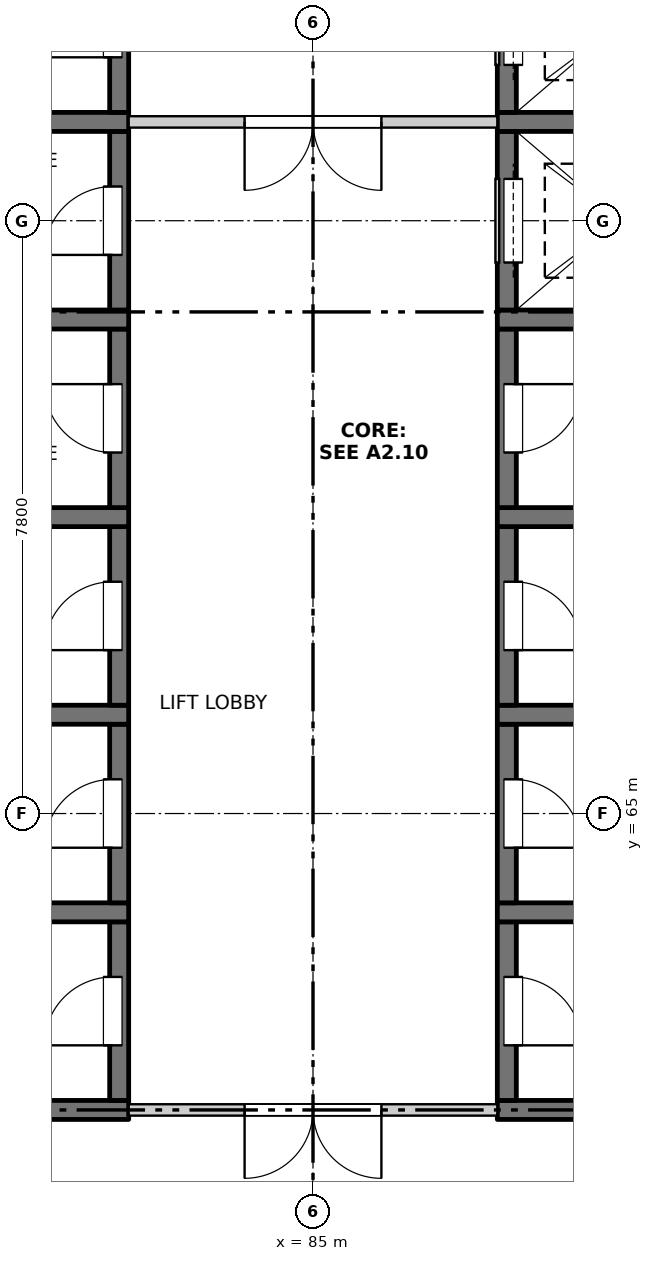
"""IFC4 building model, lengths in metres.
Left out: names, types, materials, properties, quantities, classifications, styles, units other than length and angle.
Written with IfcOpenShell. Run it as: python <this file> out.ifc"""

import sys

from ifc_helpers import new_model, si_unit, direction, frame, frame_2d, origin, place, context, subcontext, project, spatial, rectangle, extrude, element, fill, save


model = new_model("IFC4")
c1 = context("Model", 3, precision=1e-05, world=origin(), true_north=direction((0.0, 1.0)))
c2 = subcontext(c1, "Body", "Model", "MODEL_VIEW")
j1 = project(units=[si_unit("LENGTHUNIT", "METRE"), si_unit("PLANEANGLEUNIT", "RADIAN")], contexts=[c1])
p1 = place(None, origin())
s1 = spatial("IfcSite", under=j1, at=p1, CompositionType="ELEMENT")
p2 = place(p1, origin())
s2 = spatial("IfcBuilding", under=s1, at=p2, CompositionType="ELEMENT")
p3 = place(p2, frame((0.0, 0.0, 256.2)))
s3 = spatial("IfcBuildingStorey", under=s2, at=p3, CompositionType="ELEMENT", Elevation=256.2)
p4 = place(p3, frame((79.575, 61.1, -0.25), z_axis=(0.0, 0.0, 1.0), x_axis=(1.0, 0.0, 0.0)))
e1 = element("IfcWall", 1, at=p4, inside=s3, PredefinedType="SOLIDWALL", context=c2, shape_type="SweptSolid", body=[
    extrude(rectangle(XDim=3.0, YDim=0.25, at=frame_2d((1.5, 0.0))), origin(), (0.0, 0.0, 1.0), 3.4),
])
p5 = place(p3, frame((82.45, 61.225, -0.25), z_axis=(0.0, 0.0, 1.0), x_axis=(0.0, 1.0, 0.0)))
e2 = element("IfcWall", 2, at=p5, inside=s3, PredefinedType="SOLIDWALL", context=c2, shape_type="SweptSolid", body=[
    extrude(rectangle(XDim=2.35, YDim=0.25, at=frame_2d((1.175, 0.0))), origin(), (0.0, 0.0, 1.0), 3.4),
])
p6 = place(p5, frame((0.725, 0.0, 0.25)))
e3 = element("IfcOpeningElement", 3, at=p6, cuts=e2, PredefinedType="OPENING", context=c2, shape_type="SweptSolid", body=[
    extrude(rectangle(XDim=0.9, YDim=2.1, at=frame_2d((0.45, 1.05))), frame((0.0, 0.135, 0.0), z_axis=(0.0, -1.0, 0.0), x_axis=(1.0, 0.0, 0.0)), (0.0, 0.0, 1.0), 0.27),
])
p7 = place(p3, frame((79.575, 63.7, -0.25), z_axis=(0.0, 0.0, 1.0), x_axis=(1.0, 0.0, 0.0)))
e4 = element("IfcWall", 4, at=p7, inside=s3, PredefinedType="SOLIDWALL", context=c2, shape_type="SweptSolid", body=[
    extrude(rectangle(XDim=3.0, YDim=0.25, at=frame_2d((1.5, 0.0))), origin(), (0.0, 0.0, 1.0), 3.4),
])
p8 = place(p3, frame((82.45, 63.825, -0.25), z_axis=(0.0, 0.0, 1.0), x_axis=(0.0, 1.0, 0.0)))
e5 = element("IfcWall", 5, at=p8, inside=s3, PredefinedType="SOLIDWALL", context=c2, shape_type="SweptSolid", body=[
    extrude(rectangle(XDim=2.35, YDim=0.25, at=frame_2d((1.175, 0.0))), origin(), (0.0, 0.0, 1.0), 3.4),
])
p9 = place(p8, frame((0.725, 0.0, 0.25)))
e6 = element("IfcOpeningElement", 6, at=p9, cuts=e5, PredefinedType="OPENING", context=c2, shape_type="SweptSolid", body=[
    extrude(rectangle(XDim=0.9, YDim=2.1, at=frame_2d((0.45, 1.05))), frame((0.0, 0.135, 0.0), z_axis=(0.0, -1.0, 0.0), x_axis=(1.0, 0.0, 0.0)), (0.0, 0.0, 1.0), 0.27),
])
p10 = place(p3, frame((79.575, 66.3, -0.25), z_axis=(0.0, 0.0, 1.0), x_axis=(1.0, 0.0, 0.0)))
e7 = element("IfcWall", 7, at=p10, inside=s3, PredefinedType="SOLIDWALL", context=c2, shape_type="SweptSolid", body=[
    extrude(rectangle(XDim=3.0, YDim=0.25, at=frame_2d((1.5, 0.0))), origin(), (0.0, 0.0, 1.0), 3.4),
])
p11 = place(p3, frame((82.45, 66.425, -0.25), z_axis=(0.0, 0.0, 1.0), x_axis=(0.0, 1.0, 0.0)))
e8 = element("IfcWall", 8, at=p11, inside=s3, PredefinedType="SOLIDWALL", context=c2, shape_type="SweptSolid", body=[
    extrude(rectangle(XDim=2.35, YDim=0.25, at=frame_2d((1.175, 0.0))), origin(), (0.0, 0.0, 1.0), 3.4),
])
p12 = place(p11, frame((0.725, 0.0, 0.25)))
e9 = element("IfcOpeningElement", 9, at=p12, cuts=e8, PredefinedType="OPENING", context=c2, shape_type="SweptSolid", body=[
    extrude(rectangle(XDim=0.9, YDim=2.1, at=frame_2d((0.45, 1.05))), frame((0.0, 0.135, 0.0), z_axis=(0.0, -1.0, 0.0), x_axis=(1.0, 0.0, 0.0)), (0.0, 0.0, 1.0), 0.27),
])
p13 = place(p3, frame((79.575, 68.9, -0.25), z_axis=(0.0, 0.0, 1.0), x_axis=(1.0, 0.0, 0.0)))
e10 = element("IfcWall", 10, at=p13, inside=s3, PredefinedType="SOLIDWALL", context=c2, shape_type="SweptSolid", body=[
    extrude(rectangle(XDim=3.0, YDim=0.25, at=frame_2d((1.5, 0.0))), origin(), (0.0, 0.0, 1.0), 3.4),
])
p14 = place(p3, frame((82.45, 69.025, -0.25), z_axis=(0.0, 0.0, 1.0), x_axis=(0.0, 1.0, 0.0)))
e11 = element("IfcWall", 11, at=p14, inside=s3, PredefinedType="SOLIDWALL", context=c2, shape_type="SweptSolid", body=[
    extrude(rectangle(XDim=2.35, YDim=0.25, at=frame_2d((1.175, 0.0))), origin(), (0.0, 0.0, 1.0), 3.4),
])
p15 = place(p14, frame((0.725, 0.0, 0.25)))
e12 = element("IfcOpeningElement", 12, at=p15, cuts=e11, PredefinedType="OPENING", context=c2, shape_type="SweptSolid", body=[
    extrude(rectangle(XDim=0.9, YDim=2.1, at=frame_2d((0.45, 1.05))), frame((0.0, 0.135, 0.0), z_axis=(0.0, -1.0, 0.0), x_axis=(1.0, 0.0, 0.0)), (0.0, 0.0, 1.0), 0.27),
])
p16 = place(p3, frame((79.575, 71.5, -0.25), z_axis=(0.0, 0.0, 1.0), x_axis=(1.0, 0.0, 0.0)))
e13 = element("IfcWall", 13, at=p16, inside=s3, PredefinedType="SOLIDWALL", context=c2, shape_type="SweptSolid", body=[
    extrude(rectangle(XDim=3.0, YDim=0.25, at=frame_2d((1.5, 0.0))), origin(), (0.0, 0.0, 1.0), 3.4),
])
p17 = place(p3, frame((82.45, 71.625, -0.25), z_axis=(0.0, 0.0, 1.0), x_axis=(0.0, 1.0, 0.0)))
e14 = element("IfcWall", 14, at=p17, inside=s3, PredefinedType="SOLIDWALL", context=c2, shape_type="SweptSolid", body=[
    extrude(rectangle(XDim=2.35, YDim=0.25, at=frame_2d((1.175, 0.0))), origin(), (0.0, 0.0, 1.0), 3.4),
])
p18 = place(p17, frame((0.725, 0.0, 0.25)))
e15 = element("IfcOpeningElement", 15, at=p18, cuts=e14, PredefinedType="OPENING", context=c2, shape_type="SweptSolid", body=[
    extrude(rectangle(XDim=0.9, YDim=2.1, at=frame_2d((0.45, 1.05))), frame((0.0, 0.135, 0.0), z_axis=(0.0, -1.0, 0.0), x_axis=(1.0, 0.0, 0.0)), (0.0, 0.0, 1.0), 0.27),
])
p19 = place(p3, frame((79.575, 74.1, -0.25), z_axis=(0.0, 0.0, 1.0), x_axis=(1.0, 0.0, 0.0)))
e16 = element("IfcWall", 16, at=p19, inside=s3, PredefinedType="SOLIDWALL", context=c2, shape_type="SweptSolid", body=[
    extrude(rectangle(XDim=3.0, YDim=0.25, at=frame_2d((1.5, 0.0))), origin(), (0.0, 0.0, 1.0), 3.4),
])
p20 = place(p3, frame((82.45, 74.225, -0.25), z_axis=(0.0, 0.0, 1.0), x_axis=(0.0, 1.0, 0.0)))
e17 = element("IfcWall", 17, at=p20, inside=s3, PredefinedType="SOLIDWALL", context=c2, shape_type="SweptSolid", body=[
    extrude(rectangle(XDim=2.35, YDim=0.25, at=frame_2d((1.175, 0.0))), origin(), (0.0, 0.0, 1.0), 3.4),
])
p21 = place(p20, frame((0.725, 0.0, 0.25)))
e18 = element("IfcOpeningElement", 18, at=p21, cuts=e17, PredefinedType="OPENING", context=c2, shape_type="SweptSolid", body=[
    extrude(rectangle(XDim=0.9, YDim=2.1, at=frame_2d((0.45, 1.05))), frame((0.0, 0.135, 0.0), z_axis=(0.0, -1.0, 0.0), x_axis=(1.0, 0.0, 0.0)), (0.0, 0.0, 1.0), 0.27),
])
p22 = place(p3, frame((87.425, 61.1, -0.25), z_axis=(0.0, 0.0, 1.0), x_axis=(1.0, 0.0, 0.0)))
e19 = element("IfcWall", 19, at=p22, inside=s3, PredefinedType="SOLIDWALL", context=c2, shape_type="SweptSolid", body=[
    extrude(rectangle(XDim=3.0, YDim=0.25, at=frame_2d((1.5, 0.0))), origin(), (0.0, 0.0, 1.0), 3.4),
])
p23 = place(p3, frame((87.55, 61.225, -0.25), z_axis=(0.0, 0.0, 1.0), x_axis=(0.0, 1.0, 0.0)))
e20 = element("IfcWall", 20, at=p23, inside=s3, PredefinedType="SOLIDWALL", context=c2, shape_type="SweptSolid", body=[
    extrude(rectangle(XDim=2.35, YDim=0.25, at=frame_2d((1.175, 0.0))), origin(), (0.0, 0.0, 1.0), 3.4),
])
p24 = place(p23, frame((0.725, 0.0, 0.25)))
e21 = element("IfcOpeningElement", 21, at=p24, cuts=e20, PredefinedType="OPENING", context=c2, shape_type="SweptSolid", body=[
    extrude(rectangle(XDim=0.9, YDim=2.1, at=frame_2d((0.45, 1.05))), frame((0.0, 0.135, 0.0), z_axis=(0.0, -1.0, 0.0), x_axis=(1.0, 0.0, 0.0)), (0.0, 0.0, 1.0), 0.27),
])
p25 = place(p3, frame((87.425, 63.7, -0.25), z_axis=(0.0, 0.0, 1.0), x_axis=(1.0, 0.0, 0.0)))
e22 = element("IfcWall", 22, at=p25, inside=s3, PredefinedType="SOLIDWALL", context=c2, shape_type="SweptSolid", body=[
    extrude(rectangle(XDim=3.0, YDim=0.25, at=frame_2d((1.5, 0.0))), origin(), (0.0, 0.0, 1.0), 3.4),
])
p26 = place(p3, frame((87.55, 63.825, -0.25), z_axis=(0.0, 0.0, 1.0), x_axis=(0.0, 1.0, 0.0)))
e23 = element("IfcWall", 23, at=p26, inside=s3, PredefinedType="SOLIDWALL", context=c2, shape_type="SweptSolid", body=[
    extrude(rectangle(XDim=2.35, YDim=0.25, at=frame_2d((1.175, 0.0))), origin(), (0.0, 0.0, 1.0), 3.4),
])
p27 = place(p26, frame((0.725, 0.0, 0.25)))
e24 = element("IfcOpeningElement", 24, at=p27, cuts=e23, PredefinedType="OPENING", context=c2, shape_type="SweptSolid", body=[
    extrude(rectangle(XDim=0.9, YDim=2.1, at=frame_2d((0.45, 1.05))), frame((0.0, 0.135, 0.0), z_axis=(0.0, -1.0, 0.0), x_axis=(1.0, 0.0, 0.0)), (0.0, 0.0, 1.0), 0.27),
])
p28 = place(p3, frame((87.425, 66.3, -0.25), z_axis=(0.0, 0.0, 1.0), x_axis=(1.0, 0.0, 0.0)))
e25 = element("IfcWall", 25, at=p28, inside=s3, PredefinedType="SOLIDWALL", context=c2, shape_type="SweptSolid", body=[
    extrude(rectangle(XDim=3.0, YDim=0.25, at=frame_2d((1.5, 0.0))), origin(), (0.0, 0.0, 1.0), 3.4),
])
p29 = place(p3, frame((87.55, 66.425, -0.25), z_axis=(0.0, 0.0, 1.0), x_axis=(0.0, 1.0, 0.0)))
e26 = element("IfcWall", 26, at=p29, inside=s3, PredefinedType="SOLIDWALL", context=c2, shape_type="SweptSolid", body=[
    extrude(rectangle(XDim=2.35, YDim=0.25, at=frame_2d((1.175, 0.0))), origin(), (0.0, 0.0, 1.0), 3.4),
])
p30 = place(p29, frame((0.725, 0.0, 0.25)))
e27 = element("IfcOpeningElement", 27, at=p30, cuts=e26, PredefinedType="OPENING", context=c2, shape_type="SweptSolid", body=[
    extrude(rectangle(XDim=0.9, YDim=2.1, at=frame_2d((0.45, 1.05))), frame((0.0, 0.135, 0.0), z_axis=(0.0, -1.0, 0.0), x_axis=(1.0, 0.0, 0.0)), (0.0, 0.0, 1.0), 0.27),
])
p31 = place(p3, frame((87.425, 68.9, -0.25), z_axis=(0.0, 0.0, 1.0), x_axis=(1.0, 0.0, 0.0)))
e28 = element("IfcWall", 28, at=p31, inside=s3, PredefinedType="SOLIDWALL", context=c2, shape_type="SweptSolid", body=[
    extrude(rectangle(XDim=3.0, YDim=0.25, at=frame_2d((1.5, 0.0))), origin(), (0.0, 0.0, 1.0), 3.4),
])
p32 = place(p3, frame((87.55, 69.025, -0.25), z_axis=(0.0, 0.0, 1.0), x_axis=(0.0, 1.0, 0.0)))
e29 = element("IfcWall", 29, at=p32, inside=s3, PredefinedType="SOLIDWALL", context=c2, shape_type="SweptSolid", body=[
    extrude(rectangle(XDim=2.35, YDim=0.25, at=frame_2d((1.175, 0.0))), origin(), (0.0, 0.0, 1.0), 3.4),
])
p33 = place(p32, frame((0.725, 0.0, 0.25)))
e30 = element("IfcOpeningElement", 30, at=p33, cuts=e29, PredefinedType="OPENING", context=c2, shape_type="SweptSolid", body=[
    extrude(rectangle(XDim=0.9, YDim=2.1, at=frame_2d((0.45, 1.05))), frame((0.0, 0.135, 0.0), z_axis=(0.0, -1.0, 0.0), x_axis=(1.0, 0.0, 0.0)), (0.0, 0.0, 1.0), 0.27),
])
p34 = place(p3, frame((87.425, 71.5, -0.25), z_axis=(0.0, 0.0, 1.0), x_axis=(1.0, 0.0, 0.0)))
e31 = element("IfcWall", 31, at=p34, inside=s3, PredefinedType="SOLIDWALL", context=c2, shape_type="SweptSolid", body=[
    extrude(rectangle(XDim=3.0, YDim=0.25, at=frame_2d((1.5, 0.0))), origin(), (0.0, 0.0, 1.0), 3.4),
])
p35 = place(p3, frame((87.55, 71.625, -0.25), z_axis=(0.0, 0.0, 1.0), x_axis=(0.0, 1.0, 0.0)))
e32 = element("IfcWall", 32, at=p35, inside=s3, PredefinedType="SOLIDWALL", context=c2, shape_type="SweptSolid", body=[
    extrude(rectangle(XDim=2.35, YDim=0.25, at=frame_2d((1.175, 0.0))), origin(), (0.0, 0.0, 1.0), 3.4),
])
p36 = place(p35, frame((0.625, 0.0, 0.25)))
e33 = element("IfcOpeningElement", 33, at=p36, cuts=e32, PredefinedType="OPENING", context=c2, shape_type="SweptSolid", body=[
    extrude(rectangle(XDim=1.1, YDim=2.1, at=frame_2d((0.55, 1.05))), frame((0.0, 0.135, 0.0), z_axis=(0.0, -1.0, 0.0), x_axis=(1.0, 0.0, 0.0)), (0.0, 0.0, 1.0), 0.27),
])
p37 = place(p3, frame((87.425, 74.1, -0.25), z_axis=(0.0, 0.0, 1.0), x_axis=(1.0, 0.0, 0.0)))
e34 = element("IfcWall", 34, at=p37, inside=s3, PredefinedType="SOLIDWALL", context=c2, shape_type="SweptSolid", body=[
    extrude(rectangle(XDim=3.0, YDim=0.25, at=frame_2d((1.5, 0.0))), origin(), (0.0, 0.0, 1.0), 3.4),
])
p38 = place(p3, frame((87.55, 74.225, -0.25), z_axis=(0.0, 0.0, 1.0), x_axis=(0.0, 1.0, 0.0)))
e35 = element("IfcWall", 35, at=p38, inside=s3, PredefinedType="SOLIDWALL", context=c2, shape_type="SweptSolid", body=[
    extrude(rectangle(XDim=2.35, YDim=0.25, at=frame_2d((1.175, 0.0))), origin(), (0.0, 0.0, 1.0), 3.4),
])
p39 = place(p38, frame((0.625, 0.0, 0.25)))
e36 = element("IfcOpeningElement", 36, at=p39, cuts=e35, PredefinedType="OPENING", context=c2, shape_type="SweptSolid", body=[
    extrude(rectangle(XDim=1.1, YDim=2.1, at=frame_2d((0.55, 1.05))), frame((0.0, 0.135, 0.0), z_axis=(0.0, -1.0, 0.0), x_axis=(1.0, 0.0, 0.0)), (0.0, 0.0, 1.0), 0.27),
])
p40 = place(p3, frame((82.575, 61.1, 0.0), z_axis=(0.0, 0.0, 1.0), x_axis=(1.0, 0.0, 0.0)))
e37 = element("IfcWall", 37, at=p40, inside=s3, PredefinedType="PARTITIONING", context=c2, shape_type="SweptSolid", body=[
    extrude(rectangle(XDim=4.85, YDim=0.15, at=frame_2d((2.425, 0.0))), origin(), (0.0, 0.0, 1.0), 3.15),
])
p41 = place(p40, frame((1.525, 0.0, 0.0)))
e38 = element("IfcOpeningElement", 38, at=p41, cuts=e37, PredefinedType="OPENING", context=c2, shape_type="SweptSolid", body=[
    extrude(rectangle(XDim=1.8, YDim=2.1, at=frame_2d((0.9, 1.05))), frame((0.0, 0.085, 0.0), z_axis=(0.0, -1.0, 0.0), x_axis=(1.0, 0.0, 0.0)), (0.0, 0.0, 1.0), 0.17),
])
p42 = place(p3, frame((82.575, 74.1, 0.0), z_axis=(0.0, 0.0, 1.0), x_axis=(1.0, 0.0, 0.0)))
e39 = element("IfcWall", 39, at=p42, inside=s3, PredefinedType="PARTITIONING", context=c2, shape_type="SweptSolid", body=[
    extrude(rectangle(XDim=4.85, YDim=0.15, at=frame_2d((2.425, 0.0))), origin(), (0.0, 0.0, 1.0), 3.15),
])
p43 = place(p42, frame((1.525, 0.0, 0.0)))
e40 = element("IfcOpeningElement", 40, at=p43, cuts=e39, PredefinedType="OPENING", context=c2, shape_type="SweptSolid", body=[
    extrude(rectangle(XDim=1.8, YDim=2.1, at=frame_2d((0.9, 1.05))), frame((0.0, 0.085, 0.0), z_axis=(0.0, -1.0, 0.0), x_axis=(1.0, 0.0, 0.0)), (0.0, 0.0, 1.0), 0.17),
])
p44 = place(p41, origin())
e41 = element("IfcDoor", 41, at=p44, inside=s3, OperationType="DOUBLE_DOOR_SINGLE_SWING", PredefinedType="DOOR", context=c2, shape_type="SweptSolid", body=[
    extrude(rectangle(XDim=1.8, YDim=2.1, at=frame_2d((0.9, 1.05))), frame((0.0, 0.025, 0.0), z_axis=(0.0, -1.0, 0.0), x_axis=(1.0, 0.0, 0.0)), (0.0, 0.0, 1.0), 0.05),
])
fill(e38, e41)
p45 = place(p6, origin())
e42 = element("IfcDoor", 42, at=p45, inside=s3, OperationType="SINGLE_SWING_LEFT", PredefinedType="DOOR", context=c2, shape_type="SweptSolid", body=[
    extrude(rectangle(XDim=0.9, YDim=2.1, at=frame_2d((0.45, 1.05))), frame((0.0, 0.11, 0.0), z_axis=(0.0, -1.0, 0.0), x_axis=(1.0, 0.0, 0.0)), (0.0, 0.0, 1.0), 0.05),
])
fill(e3, e42)
p46 = place(p24, origin())
e43 = element("IfcDoor", 43, at=p46, inside=s3, OperationType="SINGLE_SWING_RIGHT", PredefinedType="DOOR", context=c2, shape_type="SweptSolid", body=[
    extrude(rectangle(XDim=0.9, YDim=2.1, at=frame_2d((0.45, 1.05))), frame((0.0, -0.06, 0.0), z_axis=(0.0, -1.0, 0.0), x_axis=(1.0, 0.0, 0.0)), (0.0, 0.0, 1.0), 0.05),
])
fill(e21, e43)
p47 = place(p9, origin())
e44 = element("IfcDoor", 44, at=p47, inside=s3, OperationType="SINGLE_SWING_LEFT", PredefinedType="DOOR", context=c2, shape_type="SweptSolid", body=[
    extrude(rectangle(XDim=0.9, YDim=2.1, at=frame_2d((0.45, 1.05))), frame((0.0, 0.11, 0.0), z_axis=(0.0, -1.0, 0.0), x_axis=(1.0, 0.0, 0.0)), (0.0, 0.0, 1.0), 0.05),
])
fill(e6, e44)
p48 = place(p27, origin())
e45 = element("IfcDoor", 45, at=p48, inside=s3, OperationType="SINGLE_SWING_RIGHT", PredefinedType="DOOR", context=c2, shape_type="SweptSolid", body=[
    extrude(rectangle(XDim=0.9, YDim=2.1, at=frame_2d((0.45, 1.05))), frame((0.0, -0.06, 0.0), z_axis=(0.0, -1.0, 0.0), x_axis=(1.0, 0.0, 0.0)), (0.0, 0.0, 1.0), 0.05),
])
fill(e24, e45)
p49 = place(p12, origin())
e46 = element("IfcDoor", 46, at=p49, inside=s3, OperationType="SINGLE_SWING_LEFT", PredefinedType="DOOR", context=c2, shape_type="SweptSolid", body=[
    extrude(rectangle(XDim=0.9, YDim=2.1, at=frame_2d((0.45, 1.05))), frame((0.0, 0.11, 0.0), z_axis=(0.0, -1.0, 0.0), x_axis=(1.0, 0.0, 0.0)), (0.0, 0.0, 1.0), 0.05),
])
fill(e9, e46)
p50 = place(p30, origin())
e47 = element("IfcDoor", 47, at=p50, inside=s3, OperationType="SINGLE_SWING_RIGHT", PredefinedType="DOOR", context=c2, shape_type="SweptSolid", body=[
    extrude(rectangle(XDim=0.9, YDim=2.1, at=frame_2d((0.45, 1.05))), frame((0.0, -0.06, 0.0), z_axis=(0.0, -1.0, 0.0), x_axis=(1.0, 0.0, 0.0)), (0.0, 0.0, 1.0), 0.05),
])
fill(e27, e47)
p51 = place(p15, origin())
e48 = element("IfcDoor", 48, at=p51, inside=s3, OperationType="SINGLE_SWING_RIGHT", PredefinedType="DOOR", context=c2, shape_type="SweptSolid", body=[
    extrude(rectangle(XDim=0.9, YDim=2.1, at=frame_2d((0.45, 1.05))), frame((0.0, 0.11, 0.0), z_axis=(0.0, -1.0, 0.0), x_axis=(1.0, 0.0, 0.0)), (0.0, 0.0, 1.0), 0.05),
])
fill(e12, e48)
p52 = place(p33, origin())
e49 = element("IfcDoor", 49, at=p52, inside=s3, OperationType="SINGLE_SWING_LEFT", PredefinedType="DOOR", context=c2, shape_type="SweptSolid", body=[
    extrude(rectangle(XDim=0.9, YDim=2.1, at=frame_2d((0.45, 1.05))), frame((0.0, -0.06, 0.0), z_axis=(0.0, -1.0, 0.0), x_axis=(1.0, 0.0, 0.0)), (0.0, 0.0, 1.0), 0.05),
])
fill(e30, e49)
p53 = place(p18, origin())
e50 = element("IfcDoor", 50, at=p53, inside=s3, OperationType="SINGLE_SWING_LEFT", PredefinedType="DOOR", context=c2, shape_type="SweptSolid", body=[
    extrude(rectangle(XDim=0.9, YDim=2.1, at=frame_2d((0.45, 1.05))), frame((0.0, 0.11, 0.0), z_axis=(0.0, -1.0, 0.0), x_axis=(1.0, 0.0, 0.0)), (0.0, 0.0, 1.0), 0.05),
])
fill(e15, e50)
p54 = place(p36, origin())
e51 = element("IfcDoor", 51, at=p54, inside=s3, OperationType="SLIDING_TO_LEFT", PredefinedType="DOOR", context=c2, shape_type="SweptSolid", body=[
    extrude(rectangle(XDim=1.1, YDim=2.1, at=frame_2d((0.55, 1.05))), frame((0.0, -0.06, 0.0), z_axis=(0.0, -1.0, 0.0), x_axis=(1.0, 0.0, 0.0)), (0.0, 0.0, 1.0), 0.05),
])
fill(e33, e51)
p55 = place(p43, origin())
e52 = element("IfcDoor", 52, at=p55, inside=s3, OperationType="DOUBLE_DOOR_SINGLE_SWING", PredefinedType="DOOR", context=c2, shape_type="SweptSolid", body=[
    extrude(rectangle(XDim=1.8, YDim=2.1, at=frame_2d((0.9, 1.05))), frame((0.0, 0.025, 0.0), z_axis=(0.0, -1.0, 0.0), x_axis=(1.0, 0.0, 0.0)), (0.0, 0.0, 1.0), 0.05),
])
fill(e40, e52)
p56 = place(p21, origin())
e53 = element("IfcDoor", 53, at=p56, inside=s3, OperationType="SINGLE_SWING_LEFT", PredefinedType="DOOR", context=c2, shape_type="SweptSolid", body=[
    extrude(rectangle(XDim=0.9, YDim=2.1, at=frame_2d((0.45, 1.05))), frame((0.0, 0.11, 0.0), z_axis=(0.0, -1.0, 0.0), x_axis=(1.0, 0.0, 0.0)), (0.0, 0.0, 1.0), 0.05),
])
fill(e18, e53)
p57 = place(p39, origin())
e54 = element("IfcDoor", 54, at=p57, inside=s3, OperationType="SLIDING_TO_LEFT", PredefinedType="DOOR", context=c2, shape_type="SweptSolid", body=[
    extrude(rectangle(XDim=1.1, YDim=2.1, at=frame_2d((0.55, 1.05))), frame((0.0, -0.06, 0.0), z_axis=(0.0, -1.0, 0.0), x_axis=(1.0, 0.0, 0.0)), (0.0, 0.0, 1.0), 0.05),
])
fill(e36, e54)
save(model, sys.argv[1])
